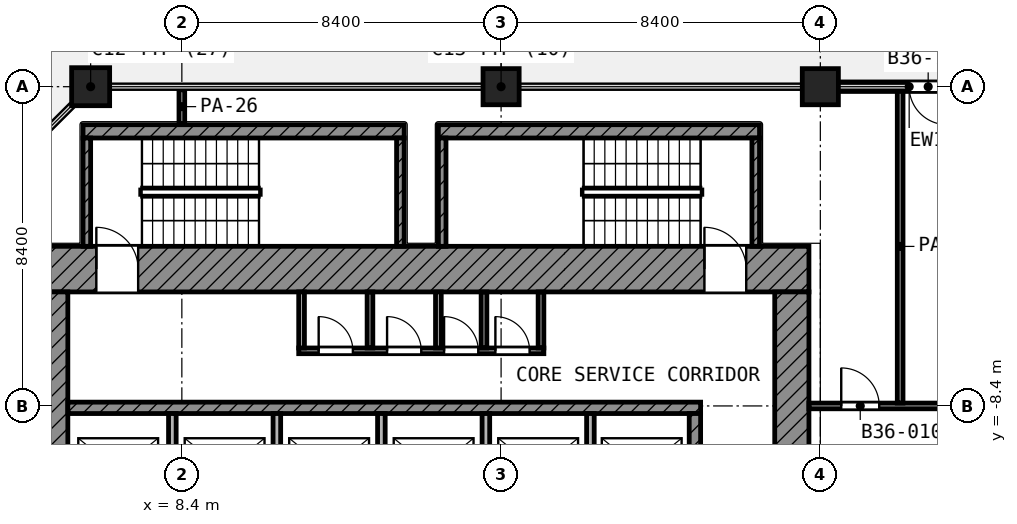
"""IFC4 building model, lengths in metres.
Left out: names, types, materials, properties, quantities, classifications, styles, units other than length and angle.
Written with IfcOpenShell. Run it as: python <this file> out.ifc"""

import sys

from ifc_helpers import new_model, si_unit, direction, frame, frame_2d, origin, origin_2d, place, context, subcontext, project, spatial, rectangle, extrude, element, fill, save


model = new_model("IFC4")
c1 = context("Model", 3, precision=1e-05, world=origin(), true_north=direction((0.0, 1.0)))
c2 = subcontext(c1, "Body", "Model", "MODEL_VIEW")
j1 = project(units=[si_unit("LENGTHUNIT", "METRE"), si_unit("PLANEANGLEUNIT", "RADIAN")], contexts=[c1])
p1 = place(None, origin())
s1 = spatial("IfcSite", under=j1, at=p1, CompositionType="ELEMENT")
p2 = place(p1, origin())
s2 = spatial("IfcBuilding", under=s1, at=p2, CompositionType="ELEMENT")
p3 = place(p2, frame((0.0, 0.0, 158.4)))
s3 = spatial("IfcBuildingStorey", under=s2, at=p3, CompositionType="ELEMENT", Elevation=158.4)
p4 = place(p3, frame((6.0, 0.0, 0.0), z_axis=(0.0, 0.0, 1.0), x_axis=(1.0, 0.0, 0.0)))
e1 = element("IfcColumn", 1, at=p4, inside=s3, PredefinedType="COLUMN", context=c2, shape_type="SweptSolid", body=[
    extrude(rectangle(XDim=1.0, YDim=1.0, at=origin_2d()), origin(), (0.0, 0.0, 1.0), 4.2),
])
for number, where, z_axis, x_axis in (
    (2, (16.8, 0.0, 0.0), (0.0, 0.0, 1.0), (1.0, 0.0, 0.0)),
    (3, (25.2, 0.0, 0.0), (0.0, 0.0, 1.0), (1.0, 0.0, 0.0)),
):
    element("IfcColumn", number, at=place(p3, frame(where, z_axis=z_axis, x_axis=x_axis)), inside=s3, PredefinedType="COLUMN", context=c2, shape_type="SweptSolid", body=[
        extrude(rectangle(XDim=0.95, YDim=0.95, at=origin_2d()), origin(), (0.0, 0.0, 1.0), 4.2),
    ])
p5 = place(p3, frame((29.4, 0.0, 0.0), z_axis=(0.0, 0.0, 1.0), x_axis=(-1.0, 0.0, 0.0)))
e4 = element("IfcWall", 4, at=p5, inside=s3, PredefinedType="SOLIDWALL", context=c2, shape_type="SweptSolid", body=[
    extrude(rectangle(XDim=3.725, YDim=0.25, at=frame_2d((1.862, 0.0))), origin(), (0.0, 0.0, 1.0), 2.58),
])
p6 = place(p5, frame((0.863, 0.0, 0.0)))
e5 = element("IfcOpeningElement", 5, at=p6, cuts=e4, PredefinedType="OPENING", context=c2, shape_type="SweptSolid", body=[
    extrude(rectangle(XDim=1.0, YDim=2.1, at=frame_2d((0.5, 1.05))), frame((0.0, 0.135, 0.0), z_axis=(0.0, -1.0, 0.0), x_axis=(1.0, 0.0, 0.0)), (0.0, 0.0, 1.0), 0.27),
])
p7 = place(p3, frame((4.2, -4.8, 0.0), z_axis=(0.0, 0.0, 1.0), x_axis=(1.0, 0.0, 0.0)))
e6 = element("IfcWall", 6, at=p7, inside=s3, PredefinedType="SHEAR", context=c2, shape_type="SweptSolid", body=[
    extrude(rectangle(XDim=20.7, YDim=1.2, at=frame_2d((10.35, 0.0))), origin(), (0.0, 0.0, 1.0), 3.6),
])
p8 = place(p7, frame((1.95, 0.0, 0.0)))
e7 = element("IfcOpeningElement", 7, at=p8, cuts=e6, PredefinedType="OPENING", context=c2, shape_type="SweptSolid", body=[
    extrude(rectangle(XDim=1.1, YDim=2.1, at=frame_2d((0.55, 1.05))), frame((0.0, 0.61, 0.0), z_axis=(0.0, -1.0, 0.0), x_axis=(1.0, 0.0, 0.0)), (0.0, 0.0, 1.0), 1.22),
])
p9 = place(p7, frame((17.95, 0.0, 0.0)))
e8 = element("IfcOpeningElement", 8, at=p9, cuts=e6, PredefinedType="OPENING", context=c2, shape_type="SweptSolid", body=[
    extrude(rectangle(XDim=1.1, YDim=2.1, at=frame_2d((0.55, 1.05))), frame((0.0, 0.61, 0.0), z_axis=(0.0, -1.0, 0.0), x_axis=(1.0, 0.0, 0.0)), (0.0, 0.0, 1.0), 1.22),
])
p10 = place(p3, frame((4.8, -24.9, 0.0), z_axis=(0.0, 0.0, 1.0), x_axis=(0.0, 1.0, 0.0)))
e9 = element("IfcWall", 9, at=p10, inside=s3, PredefinedType="SHEAR", context=c2, shape_type="SweptSolid", body=[
    extrude(rectangle(XDim=19.5, YDim=1.2, at=frame_2d((9.75, 0.0))), origin(), (0.0, 0.0, 1.0), 3.6),
])
p11 = place(p10, frame((11.35, 0.0, 0.0)))
e10 = element("IfcOpeningElement", 10, at=p11, cuts=e9, PredefinedType="OPENING", context=c2, shape_type="SweptSolid", body=[
    extrude(rectangle(XDim=1.1, YDim=2.1, at=frame_2d((0.55, 1.05))), frame((0.0, 0.61, 0.0), z_axis=(0.0, -1.0, 0.0), x_axis=(1.0, 0.0, 0.0)), (0.0, 0.0, 1.0), 1.22),
])
p12 = place(p10, frame((2.05, 0.0, 0.0)))
e11 = element("IfcOpeningElement", 11, at=p12, cuts=e9, PredefinedType="OPENING", context=c2, shape_type="SweptSolid", body=[
    extrude(rectangle(XDim=1.1, YDim=2.1, at=frame_2d((0.55, 1.05))), frame((0.0, 0.61, 0.0), z_axis=(0.0, -1.0, 0.0), x_axis=(1.0, 0.0, 0.0)), (0.0, 0.0, 1.0), 1.22),
])
p13 = place(p3, frame((24.45, -24.0, 0.0), z_axis=(0.0, 0.0, 1.0), x_axis=(0.0, 1.0, 0.0)))
e12 = element("IfcWall", 12, at=p13, inside=s3, PredefinedType="SHEAR", context=c2, shape_type="SweptSolid", body=[
    extrude(rectangle(XDim=18.6, YDim=0.9, at=frame_2d((9.3, 0.0))), origin(), (0.0, 0.0, 1.0), 3.6),
])
p14 = place(p13, frame((10.5, 0.0, 0.0)))
e13 = element("IfcOpeningElement", 13, at=p14, cuts=e12, PredefinedType="OPENING", context=c2, shape_type="SweptSolid", body=[
    extrude(rectangle(XDim=1.8, YDim=2.1, at=frame_2d((0.9, 1.05))), frame((0.0, 0.46, 0.0), z_axis=(0.0, -1.0, 0.0), x_axis=(1.0, 0.0, 0.0)), (0.0, 0.0, 1.0), 0.92),
])
p15 = place(p3, frame((5.4, -8.45, 0.0), z_axis=(0.0, 0.0, 1.0), x_axis=(1.0, 0.0, 0.0)))
e14 = element("IfcWall", 14, at=p15, inside=s3, PredefinedType="SHEAR", context=c2, shape_type="SweptSolid", body=[
    extrude(rectangle(XDim=16.65, YDim=0.3, at=frame_2d((8.325, 0.0))), origin(), (0.0, 0.0, 1.0), 3.6),
])
p16 = place(p3, frame((21.9, -10.95, 0.0), z_axis=(0.0, 0.0, 1.0), x_axis=(0.0, 1.0, 0.0)))
e15 = element("IfcWall", 15, at=p16, inside=s3, PredefinedType="SHEAR", context=c2, shape_type="SweptSolid", body=[
    extrude(rectangle(XDim=2.35, YDim=0.3, at=frame_2d((1.175, 0.0))), origin(), (0.0, 0.0, 1.0), 3.6),
])
for number, where, z_axis, x_axis in (
    (16, (8.15, -10.95, 0.0), (0.0, 0.0, 1.0), (0.0, 1.0, 0.0)),
    (17, (10.9, -10.95, 0.0), (0.0, 0.0, 1.0), (0.0, 1.0, 0.0)),
    (18, (13.65, -10.95, 0.0), (0.0, 0.0, 1.0), (0.0, 1.0, 0.0)),
    (19, (16.4, -10.95, 0.0), (0.0, 0.0, 1.0), (0.0, 1.0, 0.0)),
    (20, (19.15, -10.95, 0.0), (0.0, 0.0, 1.0), (0.0, 1.0, 0.0)),
):
    element("IfcWall", number, at=place(p3, frame(where, z_axis=z_axis, x_axis=x_axis)), inside=s3, PredefinedType="PARTITIONING", context=c2, shape_type="SweptSolid", body=[
        extrude(rectangle(XDim=2.35, YDim=0.2, at=frame_2d((1.175, 0.0))), origin(), (0.0, 0.0, 1.0), 3.6),
    ])
p17 = place(p3, frame((11.475, -6.95, 0.0), z_axis=(0.0, 0.0, 1.0), x_axis=(1.0, 0.0, 0.0)))
e21 = element("IfcWall", 21, at=p17, inside=s3, PredefinedType="PARTITIONING", context=c2, shape_type="SweptSolid", body=[
    extrude(rectangle(XDim=6.45, YDim=0.15, at=frame_2d((3.225, 0.0))), origin(), (0.0, 0.0, 1.0), 3.6),
])
p18 = place(p17, frame((0.525, 0.0, 0.0)))
e22 = element("IfcOpeningElement", 22, at=p18, cuts=e21, PredefinedType="OPENING", context=c2, shape_type="SweptSolid", body=[
    extrude(rectangle(XDim=0.9, YDim=2.1, at=frame_2d((0.45, 1.05))), frame((0.0, 0.085, 0.0), z_axis=(0.0, -1.0, 0.0), x_axis=(1.0, 0.0, 0.0)), (0.0, 0.0, 1.0), 0.17),
])
p19 = place(p17, frame((2.325, 0.0, 0.0)))
e23 = element("IfcOpeningElement", 23, at=p19, cuts=e21, PredefinedType="OPENING", context=c2, shape_type="SweptSolid", body=[
    extrude(rectangle(XDim=0.9, YDim=2.1, at=frame_2d((0.45, 1.05))), frame((0.0, 0.085, 0.0), z_axis=(0.0, -1.0, 0.0), x_axis=(1.0, 0.0, 0.0)), (0.0, 0.0, 1.0), 0.17),
])
p20 = place(p17, frame((3.825, 0.0, 0.0)))
e24 = element("IfcOpeningElement", 24, at=p20, cuts=e21, PredefinedType="OPENING", context=c2, shape_type="SweptSolid", body=[
    extrude(rectangle(XDim=0.9, YDim=2.1, at=frame_2d((0.45, 1.05))), frame((0.0, 0.085, 0.0), z_axis=(0.0, -1.0, 0.0), x_axis=(1.0, 0.0, 0.0)), (0.0, 0.0, 1.0), 0.17),
])
p21 = place(p17, frame((5.175, 0.0, 0.0)))
e25 = element("IfcOpeningElement", 25, at=p21, cuts=e21, PredefinedType="OPENING", context=c2, shape_type="SweptSolid", body=[
    extrude(rectangle(XDim=0.9, YDim=2.1, at=frame_2d((0.45, 1.05))), frame((0.0, 0.085, 0.0), z_axis=(0.0, -1.0, 0.0), x_axis=(1.0, 0.0, 0.0)), (0.0, 0.0, 1.0), 0.17),
])
for number, where, z_axis, x_axis in (
    (26, (11.55, -6.875, 0.0), (0.0, 0.0, 1.0), (0.0, 1.0, 0.0)),
    (27, (13.35, -6.875, 0.0), (0.0, 0.0, 1.0), (0.0, 1.0, 0.0)),
    (28, (15.15, -6.875, 0.0), (0.0, 0.0, 1.0), (0.0, 1.0, 0.0)),
    (29, (16.35, -6.875, 0.0), (0.0, 0.0, 1.0), (0.0, 1.0, 0.0)),
    (30, (17.85, -6.875, 0.0), (0.0, 0.0, 1.0), (0.0, 1.0, 0.0)),
):
    element("IfcWall", number, at=place(p3, frame(where, z_axis=z_axis, x_axis=x_axis)), inside=s3, PredefinedType="PARTITIONING", context=c2, shape_type="SweptSolid", body=[
        extrude(rectangle(XDim=1.475, YDim=0.15, at=frame_2d((0.738, 0.0))), origin(), (0.0, 0.0, 1.0), 3.6),
    ])
p22 = place(p3, frame((5.8, -1.175, 0.0), z_axis=(0.0, 0.0, 1.0), x_axis=(1.0, 0.0, 0.0)))
e31 = element("IfcWall", 31, at=p22, inside=s3, PredefinedType="SHEAR", context=c2, shape_type="SweptSolid", body=[
    extrude(rectangle(XDim=8.45, YDim=0.35, at=frame_2d((4.225, 0.0))), origin(), (0.0, 0.0, 1.0), 3.6),
])
for number, where, z_axis, x_axis in (
    (32, (5.9, -4.2, 0.0), (0.0, 0.0, 1.0), (0.0, 1.0, 0.0)),
    (33, (14.15, -4.2, 0.0), (0.0, 0.0, 1.0), (0.0, 1.0, 0.0)),
):
    element("IfcWall", number, at=place(p3, frame(where, z_axis=z_axis, x_axis=x_axis)), inside=s3, PredefinedType="SHEAR", context=c2, shape_type="SweptSolid", body=[
        extrude(rectangle(XDim=2.85, YDim=0.2, at=frame_2d((1.425, 0.0))), origin(), (0.0, 0.0, 1.0), 3.6),
    ])
p23 = place(p3, frame((15.15, -1.175, 0.0), z_axis=(0.0, 0.0, 1.0), x_axis=(1.0, 0.0, 0.0)))
e34 = element("IfcWall", 34, at=p23, inside=s3, PredefinedType="SHEAR", context=c2, shape_type="SweptSolid", body=[
    extrude(rectangle(XDim=8.45, YDim=0.35, at=frame_2d((4.225, 0.0))), origin(), (0.0, 0.0, 1.0), 3.6),
])
for number, where, z_axis, x_axis in (
    (35, (15.25, -4.2, 0.0), (0.0, 0.0, 1.0), (0.0, 1.0, 0.0)),
    (36, (23.5, -4.2, 0.0), (0.0, 0.0, 1.0), (0.0, 1.0, 0.0)),
):
    element("IfcWall", number, at=place(p3, frame(where, z_axis=z_axis, x_axis=x_axis)), inside=s3, PredefinedType="SHEAR", context=c2, shape_type="SweptSolid", body=[
        extrude(rectangle(XDim=2.85, YDim=0.2, at=frame_2d((1.425, 0.0))), origin(), (0.0, 0.0, 1.0), 3.6),
    ])
p24 = place(p3, frame((24.9, -8.4, 0.0), z_axis=(0.0, 0.0, 1.0), x_axis=(1.0, 0.0, 0.0)))
e37 = element("IfcWall", 37, at=p24, inside=s3, PredefinedType="PARTITIONING", context=c2, shape_type="SweptSolid", body=[
    extrude(rectangle(XDim=15.357, YDim=0.15, at=frame_2d((7.679, 0.0))), origin(), (0.0, 0.0, 1.0), 3.6),
])
p25 = place(p24, frame((0.85, 0.0, 0.0)))
e38 = element("IfcOpeningElement", 38, at=p25, cuts=e37, PredefinedType="OPENING", context=c2, shape_type="SweptSolid", body=[
    extrude(rectangle(XDim=1.0, YDim=2.1, at=frame_2d((0.5, 1.05))), frame((0.0, 0.085, 0.0), z_axis=(0.0, -1.0, 0.0), x_axis=(1.0, 0.0, 0.0)), (0.0, 0.0, 1.0), 0.17),
])
p26 = place(p24, frame((9.229, 0.0, 0.0)))
e39 = element("IfcOpeningElement", 39, at=p26, cuts=e37, PredefinedType="OPENING", context=c2, shape_type="SweptSolid", body=[
    extrude(rectangle(XDim=1.5, YDim=2.1, at=frame_2d((0.75, 1.05))), frame((0.0, 0.085, 0.0), z_axis=(0.0, -1.0, 0.0), x_axis=(1.0, 0.0, 0.0)), (0.0, 0.0, 1.0), 0.17),
])
p27 = place(p3, frame((8.4, -0.97, 0.0), z_axis=(0.0, 0.0, 1.0), x_axis=(0.0, 1.0, 0.0)))
e40 = element("IfcWall", 40, at=p27, inside=s3, PredefinedType="PARTITIONING", context=c2, shape_type="SweptSolid", body=[
    extrude(rectangle(XDim=0.89, YDim=0.15, at=frame_2d((0.445, 0.0))), origin(), (0.0, 0.0, 1.0), 2.7),
])
p28 = place(p3, frame((27.3, -8.325, 0.0), z_axis=(0.0, 0.0, 1.0), x_axis=(0.0, 1.0, 0.0)))
e41 = element("IfcWall", 41, at=p28, inside=s3, PredefinedType="PARTITIONING", context=c2, shape_type="SweptSolid", body=[
    extrude(rectangle(XDim=8.245, YDim=0.15, at=frame_2d((4.123, 0.0))), origin(), (0.0, 0.0, 1.0), 2.7),
])
p29 = place(p6, origin())
e42 = element("IfcDoor", 42, at=p29, inside=s3, OperationType="SINGLE_SWING_LEFT", PredefinedType="DOOR", context=c2, shape_type="SweptSolid", body=[
    extrude(rectangle(XDim=1.0, YDim=2.1, at=frame_2d((0.5, 1.05))), frame((0.0, 0.025, 0.0), z_axis=(0.0, -1.0, 0.0), x_axis=(1.0, 0.0, 0.0)), (0.0, 0.0, 1.0), 0.05),
])
fill(e5, e42)
p30 = place(p8, origin())
e43 = element("IfcDoor", 43, at=p30, inside=s3, OperationType="SINGLE_SWING_LEFT", PredefinedType="DOOR", context=c2, shape_type="SweptSolid", body=[
    extrude(rectangle(XDim=1.1, YDim=2.1, at=frame_2d((0.55, 1.05))), frame((0.0, 0.025, 0.0), z_axis=(0.0, -1.0, 0.0), x_axis=(1.0, 0.0, 0.0)), (0.0, 0.0, 1.0), 0.05),
])
fill(e7, e43)
p31 = place(p9, origin())
e44 = element("IfcDoor", 44, at=p31, inside=s3, OperationType="SINGLE_SWING_LEFT", PredefinedType="DOOR", context=c2, shape_type="SweptSolid", body=[
    extrude(rectangle(XDim=1.1, YDim=2.1, at=frame_2d((0.55, 1.05))), frame((0.0, 0.025, 0.0), z_axis=(0.0, -1.0, 0.0), x_axis=(1.0, 0.0, 0.0)), (0.0, 0.0, 1.0), 0.05),
])
fill(e8, e44)
p32 = place(p18, origin())
e45 = element("IfcDoor", 45, at=p32, inside=s3, OperationType="SINGLE_SWING_LEFT", PredefinedType="DOOR", context=c2, shape_type="SweptSolid", body=[
    extrude(rectangle(XDim=0.9, YDim=2.1, at=frame_2d((0.45, 1.05))), frame((0.0, 0.025, 0.0), z_axis=(0.0, -1.0, 0.0), x_axis=(1.0, 0.0, 0.0)), (0.0, 0.0, 1.0), 0.05),
])
fill(e22, e45)
p33 = place(p19, origin())
e46 = element("IfcDoor", 46, at=p33, inside=s3, OperationType="SINGLE_SWING_LEFT", PredefinedType="DOOR", context=c2, shape_type="SweptSolid", body=[
    extrude(rectangle(XDim=0.9, YDim=2.1, at=frame_2d((0.45, 1.05))), frame((0.0, 0.025, 0.0), z_axis=(0.0, -1.0, 0.0), x_axis=(1.0, 0.0, 0.0)), (0.0, 0.0, 1.0), 0.05),
])
fill(e23, e46)
p34 = place(p20, origin())
e47 = element("IfcDoor", 47, at=p34, inside=s3, OperationType="SINGLE_SWING_LEFT", PredefinedType="DOOR", context=c2, shape_type="SweptSolid", body=[
    extrude(rectangle(XDim=0.9, YDim=2.1, at=frame_2d((0.45, 1.05))), frame((0.0, 0.025, 0.0), z_axis=(0.0, -1.0, 0.0), x_axis=(1.0, 0.0, 0.0)), (0.0, 0.0, 1.0), 0.05),
])
fill(e24, e47)
p35 = place(p21, origin())
e48 = element("IfcDoor", 48, at=p35, inside=s3, OperationType="SINGLE_SWING_LEFT", PredefinedType="DOOR", context=c2, shape_type="SweptSolid", body=[
    extrude(rectangle(XDim=0.9, YDim=2.1, at=frame_2d((0.45, 1.05))), frame((0.0, 0.025, 0.0), z_axis=(0.0, -1.0, 0.0), x_axis=(1.0, 0.0, 0.0)), (0.0, 0.0, 1.0), 0.05),
])
fill(e25, e48)
p36 = place(p25, origin())
e49 = element("IfcDoor", 49, at=p36, inside=s3, OperationType="SINGLE_SWING_LEFT", PredefinedType="DOOR", context=c2, shape_type="SweptSolid", body=[
    extrude(rectangle(XDim=1.0, YDim=2.1, at=frame_2d((0.5, 1.05))), frame((0.0, 0.025, 0.0), z_axis=(0.0, -1.0, 0.0), x_axis=(1.0, 0.0, 0.0)), (0.0, 0.0, 1.0), 0.05),
])
fill(e38, e49)
save(model, sys.argv[1])
